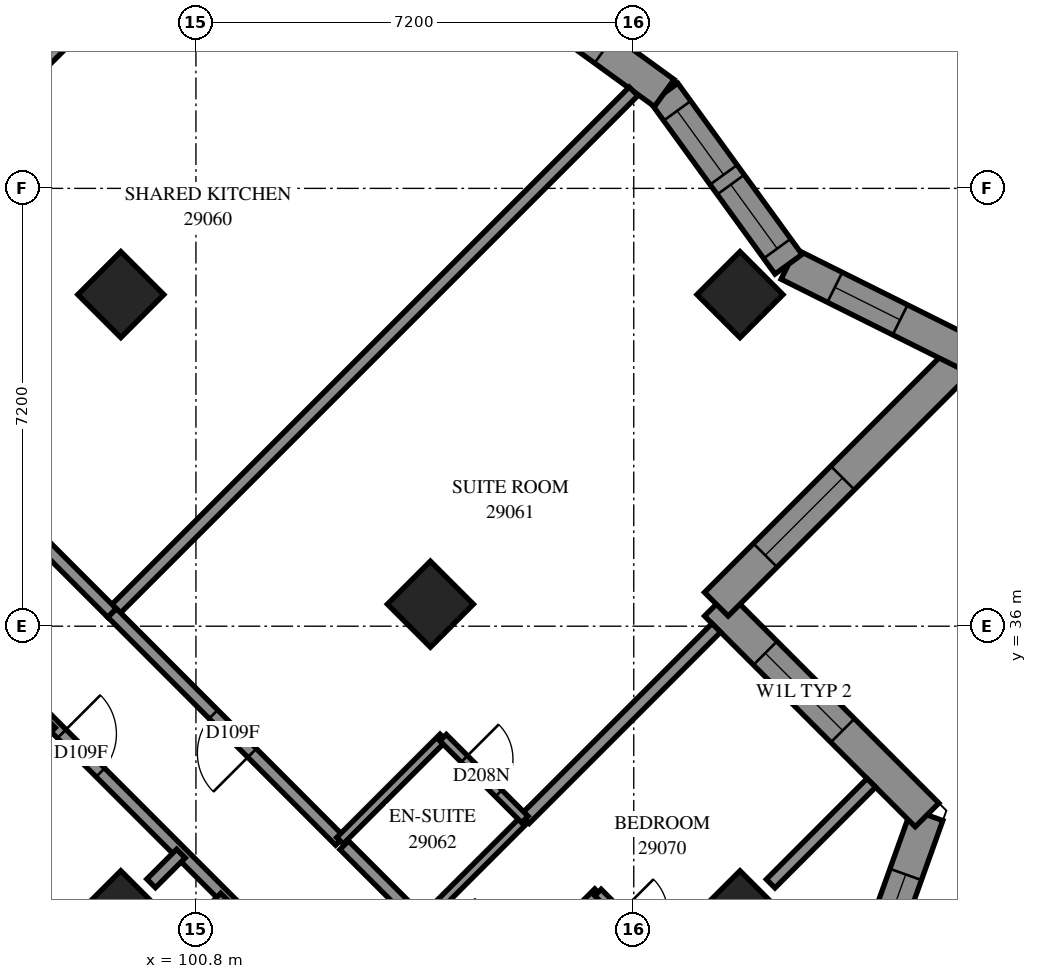
"""IFC4 building model, lengths in metres.
Left out: names, types, materials, properties, quantities, classifications, styles, units other than length and angle.
Written with IfcOpenShell. Run it as: python <this file> out.ifc"""

import sys

from ifc_helpers import new_model, si_unit, direction, frame, frame_2d, origin, origin_2d, place, context, subcontext, project, spatial, polyline, rectangle, outline, extrude, element, fill, save


model = new_model("IFC4")
c1 = context("Model", 3, precision=1e-05, world=origin(), true_north=direction((0.0, 1.0)))
c2 = subcontext(c1, "Body", "Model", "MODEL_VIEW")
j1 = project(units=[si_unit("LENGTHUNIT", "METRE"), si_unit("PLANEANGLEUNIT", "RADIAN")], contexts=[c1])
p1 = place(None, origin())
s1 = spatial("IfcSite", under=j1, at=p1, CompositionType="ELEMENT")
p2 = place(p1, origin())
s2 = spatial("IfcBuilding", under=s1, at=p2, CompositionType="ELEMENT")
p3 = place(p2, frame((0.0, 0.0, 108.4)))
s3 = spatial("IfcBuildingStorey", under=s2, at=p3, CompositionType="ELEMENT", Elevation=108.4)
for number, where, z_axis, x_axis in (
    (1, (99.565, 41.453, 0.0), (0.0, 0.0, 1.0), (0.707, -0.707, 0.0)),
    (2, (109.747, 41.453, 0.0), (0.0, 0.0, 1.0), (0.707, -0.707, 0.0)),
    (3, (104.656, 36.362, 0.0), (0.0, 0.0, 1.0), (0.707, -0.707, 0.0)),
    (4, (99.565, 31.271, 0.0), (0.0, 0.0, 1.0), (0.707, -0.707, 0.0)),
    (5, (109.747, 31.271, 0.0), (0.0, 0.0, 1.0), (0.707, -0.707, 0.0)),
):
    element("IfcColumn", number, at=place(p3, frame(where, z_axis=z_axis, x_axis=x_axis)), inside=s3, PredefinedType="COLUMN", context=c2, shape_type="SweptSolid", body=[
        extrude(rectangle(XDim=1.0, YDim=1.0, at=origin_2d()), origin(), (0.0, 0.0, 1.0), 3.1),
    ])
p4 = place(p3, frame((111.025, 27.885, 0.0), z_axis=(0.0, 0.0, 1.0), x_axis=(0.3376911299, 0.9412569791, 0.0)))
e6 = element("IfcWall", 6, at=p4, inside=s3, PredefinedType="SOLIDWALL", context=c2, shape_type="SweptSolid", body=[
    extrude(outline(polyline([(-0.124, -0.275), (5.499, -0.275), (5.15, 0.275), (0.124, 0.275), (-0.124, -0.275)])), origin(), (0.0, 0.0, 1.0), 3.1),
])
p5 = place(p4, frame((1.485, 0.0, 0.5)))
e7 = element("IfcOpeningElement", 7, at=p5, cuts=e6, PredefinedType="OPENING", context=c2, shape_type="SweptSolid", body=[
    extrude(rectangle(XDim=1.3, YDim=2.45, at=frame_2d((0.65, 1.225))), frame((0.0, 0.285, 0.0), z_axis=(0.0, -1.0, 0.0), x_axis=(1.0, 0.0, 0.0)), (0.0, 0.0, 1.0), 0.57),
])
p6 = place(p4, frame((2.985, 0.0, 0.5)))
e8 = element("IfcOpeningElement", 8, at=p6, cuts=e6, PredefinedType="OPENING", context=c2, shape_type="SweptSolid", body=[
    extrude(rectangle(XDim=1.3, YDim=2.45, at=frame_2d((0.65, 1.225))), frame((0.0, 0.285, 0.0), z_axis=(0.0, -1.0, 0.0), x_axis=(1.0, 0.0, 0.0)), (0.0, 0.0, 1.0), 0.57),
])
p7 = place(p3, frame((112.823, 32.897, 0.0), z_axis=(0.0, 0.0, 1.0), x_axis=(-0.7071067812, 0.7071067812, 0.0)))
e9 = element("IfcWall", 9, at=p7, inside=s3, PredefinedType="SOLIDWALL", context=c2, shape_type="SweptSolid", body=[
    extrude(outline(polyline([(-0.174, -0.275), (4.626, -0.275), (5.176, 0.275), (0.174, 0.275), (-0.174, -0.275)])), origin(), (0.0, 0.0, 1.0), 3.1),
])
p8 = place(p7, frame((1.963, 0.0, 0.6)))
e10 = element("IfcOpeningElement", 10, at=p8, cuts=e9, PredefinedType="OPENING", context=c2, shape_type="SweptSolid", body=[
    extrude(rectangle(XDim=1.8, YDim=1.9, at=frame_2d((0.9, 0.95))), frame((0.0, 0.285, 0.0), z_axis=(0.0, -1.0, 0.0), x_axis=(1.0, 0.0, 0.0)), (0.0, 0.0, 1.0), 0.57),
])
p9 = place(p3, frame((109.358, 36.362, 0.0), z_axis=(0.0, 0.0, 1.0), x_axis=(0.7071067812, 0.7071067812, 0.0)))
e11 = element("IfcWall", 11, at=p9, inside=s3, PredefinedType="SOLIDWALL", context=c2, shape_type="SweptSolid", body=[
    extrude(outline(polyline([(0.275, -0.275), (6.217, -0.275), (5.453, 0.275), (-0.275, 0.275), (0.275, -0.275)])), origin(), (0.0, 0.0, 1.0), 3.1),
])
p10 = place(p9, frame((1.137, 0.0, 0.6)))
e12 = element("IfcOpeningElement", 12, at=p10, cuts=e11, PredefinedType="OPENING", context=c2, shape_type="SweptSolid", body=[
    extrude(rectangle(XDim=1.8, YDim=1.9, at=frame_2d((0.9, 0.95))), frame((0.0, 0.285, 0.0), z_axis=(0.0, -1.0, 0.0), x_axis=(1.0, 0.0, 0.0)), (0.0, 0.0, 1.0), 0.57),
])
p11 = place(p3, frame((113.484, 40.488, 0.0), z_axis=(0.0, 0.0, 1.0), x_axis=(-0.8949625637, 0.446141244, 0.0)))
e13 = element("IfcWall", 13, at=p11, inside=s3, PredefinedType="SOLIDWALL", context=c2, shape_type="SweptSolid", body=[
    extrude(outline(polyline([(-0.382, -0.275), (3.216, -0.275), (3.351, 0.275), (0.382, 0.275), (-0.382, -0.275)])), origin(), (0.0, 0.0, 1.0), 3.1),
])
p12 = place(p11, frame((1.233, 0.0, 0.5)))
e14 = element("IfcOpeningElement", 14, at=p12, cuts=e13, PredefinedType="OPENING", context=c2, shape_type="SweptSolid", body=[
    extrude(rectangle(XDim=1.2, YDim=2.45, at=frame_2d((0.6, 1.225))), frame((0.0, 0.285, 0.0), z_axis=(0.0, -1.0, 0.0), x_axis=(1.0, 0.0, 0.0)), (0.0, 0.0, 1.0), 0.57),
])
p13 = place(p3, frame((110.545, 41.953, 0.0), z_axis=(0.0, 0.0, 1.0), x_axis=(-0.5874159391, 0.8092851873, 0.0)))
e15 = element("IfcWall", 15, at=p13, inside=s3, PredefinedType="SOLIDWALL", context=c2, shape_type="SweptSolid", body=[
    extrude(outline(polyline([(0.067, -0.275), (3.522, -0.275), (3.435, 0.275), (-0.067, 0.275), (0.067, -0.275)])), origin(), (0.0, 0.0, 1.0), 3.1),
])
p14 = place(p13, frame((0.318, 0.0, 0.5)))
e16 = element("IfcOpeningElement", 16, at=p14, cuts=e15, PredefinedType="OPENING", context=c2, shape_type="SweptSolid", body=[
    extrude(rectangle(XDim=1.3, YDim=2.45, at=frame_2d((0.65, 1.225))), frame((0.0, 0.285, 0.0), z_axis=(0.0, -1.0, 0.0), x_axis=(1.0, 0.0, 0.0)), (0.0, 0.0, 1.0), 0.57),
])
p15 = place(p13, frame((1.817, 0.0, 0.5)))
e17 = element("IfcOpeningElement", 17, at=p15, cuts=e15, PredefinedType="OPENING", context=c2, shape_type="SweptSolid", body=[
    extrude(rectangle(XDim=1.3, YDim=2.45, at=frame_2d((0.65, 1.225))), frame((0.0, 0.285, 0.0), z_axis=(0.0, -1.0, 0.0), x_axis=(1.0, 0.0, 0.0)), (0.0, 0.0, 1.0), 0.57),
])
p16 = place(p3, frame((108.502, 44.768, 0.0), z_axis=(0.0, 0.0, 1.0), x_axis=(-0.8092802019, 0.5874228075, 0.0)))
e18 = element("IfcWall", 18, at=p16, inside=s3, PredefinedType="SOLIDWALL", context=c2, shape_type="SweptSolid", body=[
    extrude(outline(polyline([(-0.044, -0.275), (3.411, -0.275), (3.499, 0.275), (0.044, 0.275), (-0.044, -0.275)])), origin(), (0.0, 0.0, 1.0), 3.1),
])
p17 = place(p16, frame((1.218, 0.0, 0.5)))
e19 = element("IfcOpeningElement", 19, at=p17, cuts=e18, PredefinedType="OPENING", context=c2, shape_type="SweptSolid", body=[
    extrude(rectangle(XDim=1.2, YDim=2.45, at=frame_2d((0.6, 1.225))), frame((0.0, 0.285, 0.0), z_axis=(0.0, -1.0, 0.0), x_axis=(1.0, 0.0, 0.0)), (0.0, 0.0, 1.0), 0.57),
])
p18 = place(p3, frame((92.004, 40.819, 0.0), z_axis=(0.0, 0.0, 1.0), x_axis=(0.7071067812, -0.7071067812, 0.0)))
e20 = element("IfcWall", 20, at=p18, inside=s3, PredefinedType="PARTITIONING", context=c2, shape_type="SweptSolid", body=[
    extrude(rectangle(XDim=19.298, YDim=0.2, at=frame_2d((9.649, 0.0))), origin(), (0.0, 0.0, 1.0), 3.1),
])
p19 = place(p18, frame((3.489, 0.0, 0.0)))
e21 = element("IfcOpeningElement", 21, at=p19, cuts=e20, PredefinedType="OPENING", context=c2, shape_type="SweptSolid", body=[
    extrude(rectangle(XDim=0.9, YDim=2.1, at=frame_2d((0.45, 1.05))), frame((0.0, 0.11, 0.0), z_axis=(0.0, -1.0, 0.0), x_axis=(1.0, 0.0, 0.0)), (0.0, 0.0, 1.0), 0.22),
])
p20 = place(p18, frame((9.319, 0.0, 0.0)))
e22 = element("IfcOpeningElement", 22, at=p20, cuts=e20, PredefinedType="OPENING", context=c2, shape_type="SweptSolid", body=[
    extrude(rectangle(XDim=0.9, YDim=2.1, at=frame_2d((0.45, 1.05))), frame((0.0, 0.11, 0.0), z_axis=(0.0, -1.0, 0.0), x_axis=(1.0, 0.0, 0.0)), (0.0, 0.0, 1.0), 0.22),
])
p21 = place(p18, frame((15.961, 0.0, 0.0)))
e23 = element("IfcOpeningElement", 23, at=p21, cuts=e20, PredefinedType="OPENING", context=c2, shape_type="SweptSolid", body=[
    extrude(rectangle(XDim=0.9, YDim=2.1, at=frame_2d((0.45, 1.05))), frame((0.0, 0.11, 0.0), z_axis=(0.0, -1.0, 0.0), x_axis=(1.0, 0.0, 0.0)), (0.0, 0.0, 1.0), 0.22),
])
p22 = place(p3, frame((99.423, 36.221, 0.0), z_axis=(0.0, 0.0, 1.0), x_axis=(0.7071067812, 0.7071067812, 0.0)))
e24 = element("IfcWall", 24, at=p22, inside=s3, PredefinedType="PARTITIONING", context=c2, shape_type="SweptSolid", body=[
    extrude(rectangle(XDim=12.125, YDim=0.2, at=frame_2d((6.062, 0.0))), origin(), (0.0, 0.0, 1.0), 3.1),
])
p23 = place(p3, frame((94.331, 41.313, 0.0), z_axis=(0.0, 0.0, 1.0), x_axis=(0.7071109253, 0.7071026371, 0.0)))
e25 = element("IfcWall", 25, at=p23, inside=s3, PredefinedType="PARTITIONING", context=c2, shape_type="SweptSolid", body=[
    extrude(rectangle(XDim=12.065, YDim=0.2, at=frame_2d((6.033, 0.0))), origin(), (0.0, 0.0, 1.0), 3.1),
])
p24 = place(p3, frame((93.413, 42.233, 0.0), z_axis=(0.0, 0.0, 1.0), x_axis=(0.7071067812, 0.7071067812, 0.0)))
e26 = element("IfcWall", 26, at=p24, inside=s3, PredefinedType="PARTITIONING", context=c2, shape_type="SweptSolid", body=[
    extrude(rectangle(XDim=9.699, YDim=0.2, at=frame_2d((4.849, 0.0))), origin(), (0.0, 0.0, 1.0), 3.1),
])
p25 = place(p24, frame((0.249, 0.0, 0.0)))
e27 = element("IfcOpeningElement", 27, at=p25, cuts=e26, PredefinedType="OPENING", context=c2, shape_type="SweptSolid", body=[
    extrude(rectangle(XDim=1.0, YDim=2.1, at=frame_2d((0.5, 1.05))), frame((0.0, 0.11, 0.0), z_axis=(0.0, -1.0, 0.0), x_axis=(1.0, 0.0, 0.0)), (0.0, 0.0, 1.0), 0.22),
])
p26 = place(p3, frame((93.411, 42.227, 0.0), z_axis=(0.0, 0.0, 1.0), x_axis=(0.7071067812, -0.7071067812, 0.0)))
e28 = element("IfcWall", 28, at=p26, inside=s3, PredefinedType="PARTITIONING", context=c2, shape_type="SweptSolid", body=[
    extrude(rectangle(XDim=8.499, YDim=0.2, at=frame_2d((4.25, 0.0))), origin(), (0.0, 0.0, 1.0), 3.1),
])
p27 = place(p26, frame((3.672, 0.0, 0.0)))
e29 = element("IfcOpeningElement", 29, at=p27, cuts=e28, PredefinedType="OPENING", context=c2, shape_type="SweptSolid", body=[
    extrude(rectangle(XDim=1.0, YDim=2.1, at=frame_2d((0.5, 1.05))), frame((0.0, 0.11, 0.0), z_axis=(0.0, -1.0, 0.0), x_axis=(1.0, 0.0, 0.0)), (0.0, 0.0, 1.0), 0.22),
])
p28 = place(p3, frame((103.239, 32.399, 0.0), z_axis=(0.0, 0.0, 1.0), x_axis=(0.7071067812, -0.7071067812, 0.0)))
e30 = element("IfcWall", 30, at=p28, inside=s3, PredefinedType="PARTITIONING", context=c2, shape_type="SweptSolid", body=[
    extrude(rectangle(XDim=5.399, YDim=0.2, at=frame_2d((2.7, 0.0))), origin(), (0.0, 0.0, 1.0), 3.1),
])
p29 = place(p28, frame((2.15, 0.0, 0.0)))
e31 = element("IfcOpeningElement", 31, at=p29, cuts=e30, PredefinedType="OPENING", context=c2, shape_type="SweptSolid", body=[
    extrude(rectangle(XDim=0.9, YDim=2.1, at=frame_2d((0.45, 1.05))), frame((0.0, 0.11, 0.0), z_axis=(0.0, -1.0, 0.0), x_axis=(1.0, 0.0, 0.0)), (0.0, 0.0, 1.0), 0.22),
])
p30 = place(p3, frame((103.168, 32.47, 0.0), z_axis=(0.0, 0.0, 1.0), x_axis=(-0.7067858967, 0.7074275201, 0.0)))
e32 = element("IfcWall", 32, at=p30, inside=s3, PredefinedType="PARTITIONING", context=c2, shape_type="SweptSolid", body=[
    extrude(rectangle(XDim=5.299, YDim=0.2, at=frame_2d((2.65, 0.0))), origin(), (0.0, 0.0, 1.0), 3.1),
])
p31 = place(p30, frame((2.043, 0.0, 0.0)))
e33 = element("IfcOpeningElement", 33, at=p31, cuts=e32, PredefinedType="OPENING", context=c2, shape_type="SweptSolid", body=[
    extrude(rectangle(XDim=0.9, YDim=2.1, at=frame_2d((0.45, 1.05))), frame((0.0, 0.11, 0.0), z_axis=(0.0, -1.0, 0.0), x_axis=(1.0, 0.0, 0.0)), (0.0, 0.0, 1.0), 0.22),
])
p32 = place(p3, frame((106.211, 32.827, 0.0), z_axis=(0.0, 0.0, 1.0), x_axis=(0.7071067812, 0.7071067812, 0.0)))
e34 = element("IfcWall", 34, at=p32, inside=s3, PredefinedType="PARTITIONING", context=c2, shape_type="SweptSolid", body=[
    extrude(rectangle(XDim=4.45, YDim=0.2, at=frame_2d((2.225, 0.0))), origin(), (0.0, 0.0, 1.0), 3.1),
])
for number, where, z_axis, x_axis in (
    (35, (96.735, 32.685, 0.0), (0.0, 0.0, 1.0), (0.707, 0.707, 0.0)),
    (36, (103.169, 32.473, 0.0), (0.0, 0.0, 1.0), (0.707, 0.707, 0.0)),
    (37, (99.563, 29.857, 0.0), (0.0, 0.0, 1.0), (0.707, 0.707, 0.0)),
):
    element("IfcWall", number, at=place(p3, frame(where, z_axis=z_axis, x_axis=x_axis)), inside=s3, PredefinedType="PARTITIONING", context=c2, shape_type="SweptSolid", body=[
        extrude(rectangle(XDim=2.401, YDim=0.15, at=frame_2d((1.201, 0.0))), origin(), (0.0, 0.0, 1.0), 3.1),
    ])
for number, where, z_axis, x_axis in (
    (38, (104.511, 31.133, 0.0), (0.0, 0.0, 1.0), (0.708, 0.707, 0.0)),
    (39, (105.713, 29.931, 0.0), (0.0, 0.0, 1.0), (0.708, 0.707, 0.0)),
):
    element("IfcWall", number, at=place(p3, frame(where, z_axis=z_axis, x_axis=x_axis)), inside=s3, PredefinedType="PARTITIONING", context=c2, shape_type="SweptSolid", body=[
        extrude(rectangle(XDim=2.4, YDim=0.15, at=frame_2d((1.2, 0.0))), origin(), (0.0, 0.0, 1.0), 3.1),
    ])
p33 = place(p3, frame((110.251, 31.767, 0.0), z_axis=(0.0, 0.0, 1.0), x_axis=(0.7066584143, 0.7075548639, 0.0)))
e40 = element("IfcWall", 40, at=p33, inside=s3, PredefinedType="PARTITIONING", context=c2, shape_type="SweptSolid", body=[
    extrude(rectangle(XDim=2.343, YDim=0.2, at=frame_2d((1.171, 0.0))), origin(), (0.0, 0.0, 1.0), 3.1),
])
p34 = place(p3, frame((107.411, 31.621, 0.0), z_axis=(0.0, 0.0, 1.0), x_axis=(0.7071067812, -0.7071067812, 0.0)))
e41 = element("IfcWall", 41, at=p34, inside=s3, PredefinedType="PARTITIONING", context=c2, shape_type="SweptSolid", body=[
    extrude(rectangle(XDim=1.901, YDim=0.15, at=frame_2d((0.95, 0.0))), origin(), (0.0, 0.0, 1.0), 3.1),
])
p35 = place(p34, frame((0.493, 0.0, 0.0)))
e42 = element("IfcOpeningElement", 42, at=p35, cuts=e41, PredefinedType="OPENING", context=c2, shape_type="SweptSolid", body=[
    extrude(rectangle(XDim=0.8, YDim=2.1, at=frame_2d((0.4, 1.05))), frame((0.0, 0.085, 0.0), z_axis=(0.0, -1.0, 0.0), x_axis=(1.0, 0.0, 0.0)), (0.0, 0.0, 1.0), 0.17),
])
p36 = place(p3, frame((104.865, 34.167, 0.0), z_axis=(0.0, 0.0, 1.0), x_axis=(0.7071067812, -0.7071067812, 0.0)))
e43 = element("IfcWall", 43, at=p36, inside=s3, PredefinedType="PARTITIONING", context=c2, shape_type="SweptSolid", body=[
    extrude(rectangle(XDim=1.901, YDim=0.15, at=frame_2d((0.95, 0.0))), origin(), (0.0, 0.0, 1.0), 3.1),
])
p37 = place(p36, frame((0.493, 0.0, 0.0)))
e44 = element("IfcOpeningElement", 44, at=p37, cuts=e43, PredefinedType="OPENING", context=c2, shape_type="SweptSolid", body=[
    extrude(rectangle(XDim=0.8, YDim=2.1, at=frame_2d((0.4, 1.05))), frame((0.0, 0.085, 0.0), z_axis=(0.0, -1.0, 0.0), x_axis=(1.0, 0.0, 0.0)), (0.0, 0.0, 1.0), 0.17),
])
p38 = place(p3, frame((100.063, 31.771, 0.0), z_axis=(0.0, 0.0, 1.0), x_axis=(0.7071067812, 0.7071067812, 0.0)))
e45 = element("IfcWall", 45, at=p38, inside=s3, PredefinedType="PARTITIONING", context=c2, shape_type="SweptSolid", body=[
    extrude(rectangle(XDim=0.693, YDim=0.2, at=frame_2d((0.346, 0.0))), origin(), (0.0, 0.0, 1.0), 3.1),
])
p39 = place(p6, origin())
e46 = element("IfcWindow", 46, at=p39, inside=s3, PartitioningType="SINGLE_PANEL", PredefinedType="WINDOW", context=c2, shape_type="SweptSolid", body=[
    extrude(rectangle(XDim=1.3, YDim=2.45, at=frame_2d((0.65, 1.225))), frame((0.0, 0.155, 0.0), z_axis=(0.0, -1.0, 0.0), x_axis=(1.0, 0.0, 0.0)), (0.0, 0.0, 1.0), 0.06),
])
fill(e8, e46)
p40 = place(p8, origin())
e47 = element("IfcWindow", 47, at=p40, inside=s3, PartitioningType="SINGLE_PANEL", PredefinedType="WINDOW", context=c2, shape_type="SweptSolid", body=[
    extrude(rectangle(XDim=1.8, YDim=1.9, at=frame_2d((0.9, 0.95))), frame((0.0, 0.155, 0.0), z_axis=(0.0, -1.0, 0.0), x_axis=(1.0, 0.0, 0.0)), (0.0, 0.0, 1.0), 0.06),
])
fill(e10, e47)
p41 = place(p10, origin())
e48 = element("IfcWindow", 48, at=p41, inside=s3, PartitioningType="SINGLE_PANEL", PredefinedType="WINDOW", context=c2, shape_type="SweptSolid", body=[
    extrude(rectangle(XDim=1.8, YDim=1.9, at=frame_2d((0.9, 0.95))), frame((0.0, 0.155, 0.0), z_axis=(0.0, -1.0, 0.0), x_axis=(1.0, 0.0, 0.0)), (0.0, 0.0, 1.0), 0.06),
])
fill(e12, e48)
p42 = place(p12, origin())
e49 = element("IfcWindow", 49, at=p42, inside=s3, PartitioningType="SINGLE_PANEL", PredefinedType="WINDOW", context=c2, shape_type="SweptSolid", body=[
    extrude(rectangle(XDim=1.2, YDim=2.45, at=frame_2d((0.6, 1.225))), frame((0.0, 0.155, 0.0), z_axis=(0.0, -1.0, 0.0), x_axis=(1.0, 0.0, 0.0)), (0.0, 0.0, 1.0), 0.06),
])
fill(e14, e49)
p43 = place(p14, origin())
e50 = element("IfcWindow", 50, at=p43, inside=s3, PartitioningType="SINGLE_PANEL", PredefinedType="WINDOW", context=c2, shape_type="SweptSolid", body=[
    extrude(rectangle(XDim=1.3, YDim=2.45, at=frame_2d((0.65, 1.225))), frame((0.0, 0.155, 0.0), z_axis=(0.0, -1.0, 0.0), x_axis=(1.0, 0.0, 0.0)), (0.0, 0.0, 1.0), 0.06),
])
fill(e16, e50)
p44 = place(p15, origin())
e51 = element("IfcWindow", 51, at=p44, inside=s3, PartitioningType="SINGLE_PANEL", PredefinedType="WINDOW", context=c2, shape_type="SweptSolid", body=[
    extrude(rectangle(XDim=1.3, YDim=2.45, at=frame_2d((0.65, 1.225))), frame((0.0, 0.155, 0.0), z_axis=(0.0, -1.0, 0.0), x_axis=(1.0, 0.0, 0.0)), (0.0, 0.0, 1.0), 0.06),
])
fill(e17, e51)
p45 = place(p17, origin())
e52 = element("IfcWindow", 52, at=p45, inside=s3, PartitioningType="SINGLE_PANEL", PredefinedType="WINDOW", context=c2, shape_type="SweptSolid", body=[
    extrude(rectangle(XDim=1.2, YDim=2.45, at=frame_2d((0.6, 1.225))), frame((0.0, 0.155, 0.0), z_axis=(0.0, -1.0, 0.0), x_axis=(1.0, 0.0, 0.0)), (0.0, 0.0, 1.0), 0.06),
])
fill(e19, e52)
p46 = place(p31, origin())
e53 = element("IfcDoor", 53, at=p46, inside=s3, OperationType="SINGLE_SWING_RIGHT", PredefinedType="DOOR", context=c2, shape_type="SweptSolid", body=[
    extrude(rectangle(XDim=0.9, YDim=2.1, at=frame_2d((0.45, 1.05))), frame((0.0, 0.025, 0.0), z_axis=(0.0, -1.0, 0.0), x_axis=(1.0, 0.0, 0.0)), (0.0, 0.0, 1.0), 0.05),
])
fill(e33, e53)
p47 = place(p37, origin())
e54 = element("IfcDoor", 54, at=p47, inside=s3, OperationType="SINGLE_SWING_RIGHT", PredefinedType="DOOR", context=c2, shape_type="SweptSolid", body=[
    extrude(rectangle(XDim=0.8, YDim=2.1, at=frame_2d((0.4, 1.05))), frame((0.0, 0.025, 0.0), z_axis=(0.0, -1.0, 0.0), x_axis=(1.0, 0.0, 0.0)), (0.0, 0.0, 1.0), 0.05),
])
fill(e44, e54)
p48 = place(p20, origin())
e55 = element("IfcDoor", 55, at=p48, inside=s3, OperationType="SINGLE_SWING_RIGHT", PredefinedType="DOOR", context=c2, shape_type="SweptSolid", body=[
    extrude(rectangle(XDim=0.9, YDim=2.1, at=frame_2d((0.45, 1.05))), frame((0.0, 0.025, 0.0), z_axis=(0.0, -1.0, 0.0), x_axis=(1.0, 0.0, 0.0)), (0.0, 0.0, 1.0), 0.05),
])
fill(e22, e55)
save(model, sys.argv[1])
